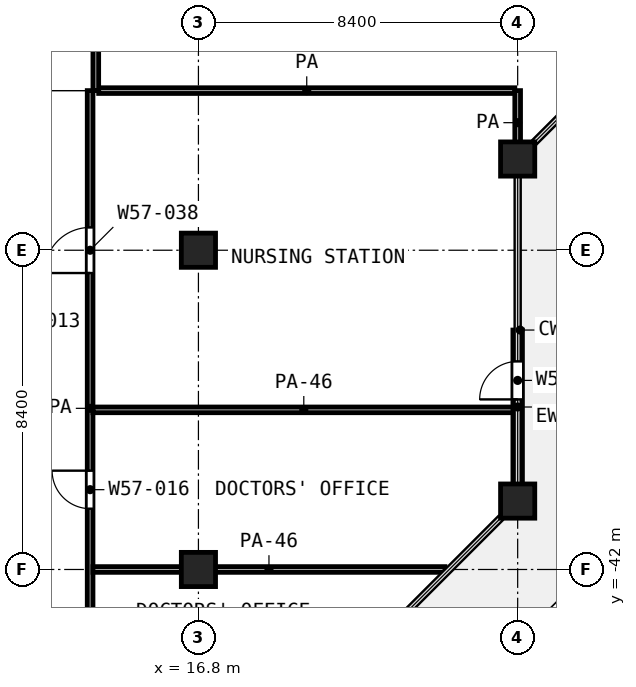
"""IFC4 building model, lengths in metres.
Left out: names, types, materials, properties, quantities, classifications, styles, units other than length and angle.
Written with IfcOpenShell. Run it as: python <this file> out.ifc"""

import sys

from ifc_helpers import new_model, si_unit, direction, frame, frame_2d, origin, origin_2d, place, context, subcontext, project, spatial, rectangle, extrude, element, fill, save


model = new_model("IFC4")
c1 = context("Model", 3, precision=1e-05, world=origin(), true_north=direction((0.0, 1.0)))
c2 = subcontext(c1, "Body", "Model", "MODEL_VIEW")
j1 = project(units=[si_unit("LENGTHUNIT", "METRE"), si_unit("PLANEANGLEUNIT", "RADIAN")], contexts=[c1])
p1 = place(None, origin())
s1 = spatial("IfcSite", under=j1, at=p1, CompositionType="ELEMENT")
p2 = place(p1, origin())
s2 = spatial("IfcBuilding", under=s1, at=p2, CompositionType="ELEMENT")
p3 = place(p2, frame((0.0, 0.0, 247.4)))
s3 = spatial("IfcBuildingStorey", under=s2, at=p3, CompositionType="ELEMENT", Elevation=247.4)
for number, where, z_axis, x_axis in (
    (1, (25.2, -31.2, 0.0), (0.0, 0.0, 1.0), (1.0, 0.0, 0.0)),
    (2, (16.8, -33.6, 0.0), (0.0, 0.0, 1.0), (1.0, 0.0, 0.0)),
    (3, (25.2, -40.2, 0.0), (0.0, 0.0, 1.0), (1.0, 0.0, 0.0)),
    (4, (16.8, -42.0, 0.0), (0.0, 0.0, 1.0), (1.0, 0.0, 0.0)),
):
    element("IfcColumn", number, at=place(p3, frame(where, z_axis=z_axis, x_axis=x_axis)), inside=s3, PredefinedType="COLUMN", context=c2, shape_type="SweptSolid", body=[
        extrude(rectangle(XDim=0.9, YDim=0.9, at=origin_2d()), origin(), (0.0, 0.0, 1.0), 4.2),
    ])
p4 = place(p3, frame((25.2, -39.75, 0.0), z_axis=(0.0, 0.0, 1.0), x_axis=(0.0, 1.0, 0.0)))
e5 = element("IfcWall", 5, at=p4, inside=s3, PredefinedType="SOLIDWALL", context=c2, shape_type="SweptSolid", body=[
    extrude(rectangle(XDim=4.05, YDim=0.25, at=frame_2d((2.025, 0.0))), origin(), (0.0, 0.0, 1.0), 2.58),
])
p5 = place(p4, frame((2.225, 0.0, 0.0)))
e6 = element("IfcOpeningElement", 6, at=p5, cuts=e5, PredefinedType="OPENING", context=c2, shape_type="SweptSolid", body=[
    extrude(rectangle(XDim=1.0, YDim=2.1, at=frame_2d((0.5, 1.05))), frame((0.0, 0.135, 0.0), z_axis=(0.0, -1.0, 0.0), x_axis=(1.0, 0.0, 0.0)), (0.0, 0.0, 1.0), 0.27),
])
p6 = place(p3, frame((14.025, -42.0, 0.0), z_axis=(0.0, 0.0, 1.0), x_axis=(1.0, 0.0, 0.0)))
e7 = element("IfcWall", 7, at=p6, inside=s3, PredefinedType="PARTITIONING", context=c2, shape_type="SweptSolid", body=[
    extrude(rectangle(XDim=9.262, YDim=0.15, at=frame_2d((4.631, 0.0))), origin(), (0.0, 0.0, 1.0), 2.7),
])
p7 = place(p3, frame((14.025, -37.8, 0.0), z_axis=(0.0, 0.0, 1.0), x_axis=(1.0, 0.0, 0.0)))
e8 = element("IfcWall", 8, at=p7, inside=s3, PredefinedType="PARTITIONING", context=c2, shape_type="SweptSolid", body=[
    extrude(rectangle(XDim=11.095, YDim=0.15, at=frame_2d((5.548, 0.0))), origin(), (0.0, 0.0, 1.0), 2.7),
])
p8 = place(p3, frame((14.175, -29.4, 0.0), z_axis=(0.0, 0.0, 1.0), x_axis=(1.0, 0.0, 0.0)))
e9 = element("IfcWall", 9, at=p8, inside=s3, PredefinedType="PARTITIONING", context=c2, shape_type="SweptSolid", body=[
    extrude(rectangle(XDim=10.95, YDim=0.15, at=frame_2d((5.475, 0.0))), origin(), (0.0, 0.0, 1.0), 3.6),
])
p9 = place(p3, frame((13.95, -46.12, 0.0), z_axis=(0.0, 0.0, 1.0), x_axis=(0.0, 1.0, 0.0)))
e10 = element("IfcWall", 10, at=p9, inside=s3, PredefinedType="PARTITIONING", context=c2, shape_type="SweptSolid", body=[
    extrude(rectangle(XDim=16.72, YDim=0.15, at=frame_2d((8.36, 0.0))), origin(), (0.0, 0.0, 1.0), 3.6),
])
p10 = place(p9, frame((11.92, 0.0, 0.0)))
e11 = element("IfcOpeningElement", 11, at=p10, cuts=e10, PredefinedType="OPENING", context=c2, shape_type="SweptSolid", body=[
    extrude(rectangle(XDim=1.2, YDim=2.1, at=frame_2d((0.6, 1.05))), frame((0.0, 0.085, 0.0), z_axis=(0.0, -1.0, 0.0), x_axis=(1.0, 0.0, 0.0)), (0.0, 0.0, 1.0), 0.17),
])
p11 = place(p9, frame((5.72, 0.0, 0.0)))
e12 = element("IfcOpeningElement", 12, at=p11, cuts=e10, PredefinedType="OPENING", context=c2, shape_type="SweptSolid", body=[
    extrude(rectangle(XDim=1.0, YDim=2.1, at=frame_2d((0.5, 1.05))), frame((0.0, 0.085, 0.0), z_axis=(0.0, -1.0, 0.0), x_axis=(1.0, 0.0, 0.0)), (0.0, 0.0, 1.0), 0.17),
])
p12 = place(p9, frame((1.52, 0.0, 0.0)))
e13 = element("IfcOpeningElement", 13, at=p12, cuts=e10, PredefinedType="OPENING", context=c2, shape_type="SweptSolid", body=[
    extrude(rectangle(XDim=1.0, YDim=2.1, at=frame_2d((0.5, 1.05))), frame((0.0, 0.085, 0.0), z_axis=(0.0, -1.0, 0.0), x_axis=(1.0, 0.0, 0.0)), (0.0, 0.0, 1.0), 0.17),
])
p13 = place(p3, frame((14.1, -29.4, 0.0), z_axis=(0.0, 0.0, 1.0), x_axis=(0.0, 1.0, 0.0)))
e14 = element("IfcWall", 14, at=p13, inside=s3, PredefinedType="PARTITIONING", context=c2, shape_type="SweptSolid", body=[
    extrude(rectangle(XDim=4.6, YDim=0.15, at=frame_2d((2.3, 0.0))), origin(), (0.0, 0.0, 1.0), 3.6),
])
p14 = place(p3, frame((25.2, -31.087, 0.0), z_axis=(0.0, 0.0, 1.0), x_axis=(0.0, 1.0, 0.0)))
e15 = element("IfcWall", 15, at=p14, inside=s3, PredefinedType="PARTITIONING", context=c2, shape_type="SweptSolid", body=[
    extrude(rectangle(XDim=1.687, YDim=0.15, at=frame_2d((0.844, 0.0))), origin(), (0.0, 0.0, 1.0), 3.6),
])
p15 = place(p5, origin())
e16 = element("IfcDoor", 16, at=p15, inside=s3, OperationType="SINGLE_SWING_LEFT", PredefinedType="DOOR", context=c2, shape_type="SweptSolid", body=[
    extrude(rectangle(XDim=1.0, YDim=2.1, at=frame_2d((0.5, 1.05))), frame((0.0, 0.025, 0.0), z_axis=(0.0, -1.0, 0.0), x_axis=(1.0, 0.0, 0.0)), (0.0, 0.0, 1.0), 0.05),
])
fill(e6, e16)
p16 = place(p10, origin())
e17 = element("IfcDoor", 17, at=p16, inside=s3, OperationType="SINGLE_SWING_LEFT", PredefinedType="DOOR", context=c2, shape_type="SweptSolid", body=[
    extrude(rectangle(XDim=1.2, YDim=2.1, at=frame_2d((0.6, 1.05))), frame((0.0, 0.025, 0.0), z_axis=(0.0, -1.0, 0.0), x_axis=(1.0, 0.0, 0.0)), (0.0, 0.0, 1.0), 0.05),
])
fill(e11, e17)
p17 = place(p11, origin())
e18 = element("IfcDoor", 18, at=p17, inside=s3, OperationType="SINGLE_SWING_RIGHT", PredefinedType="DOOR", context=c2, shape_type="SweptSolid", body=[
    extrude(rectangle(XDim=1.0, YDim=2.1, at=frame_2d((0.5, 1.05))), frame((0.0, 0.025, 0.0), z_axis=(0.0, -1.0, 0.0), x_axis=(1.0, 0.0, 0.0)), (0.0, 0.0, 1.0), 0.05),
])
fill(e12, e18)
save(model, sys.argv[1])
